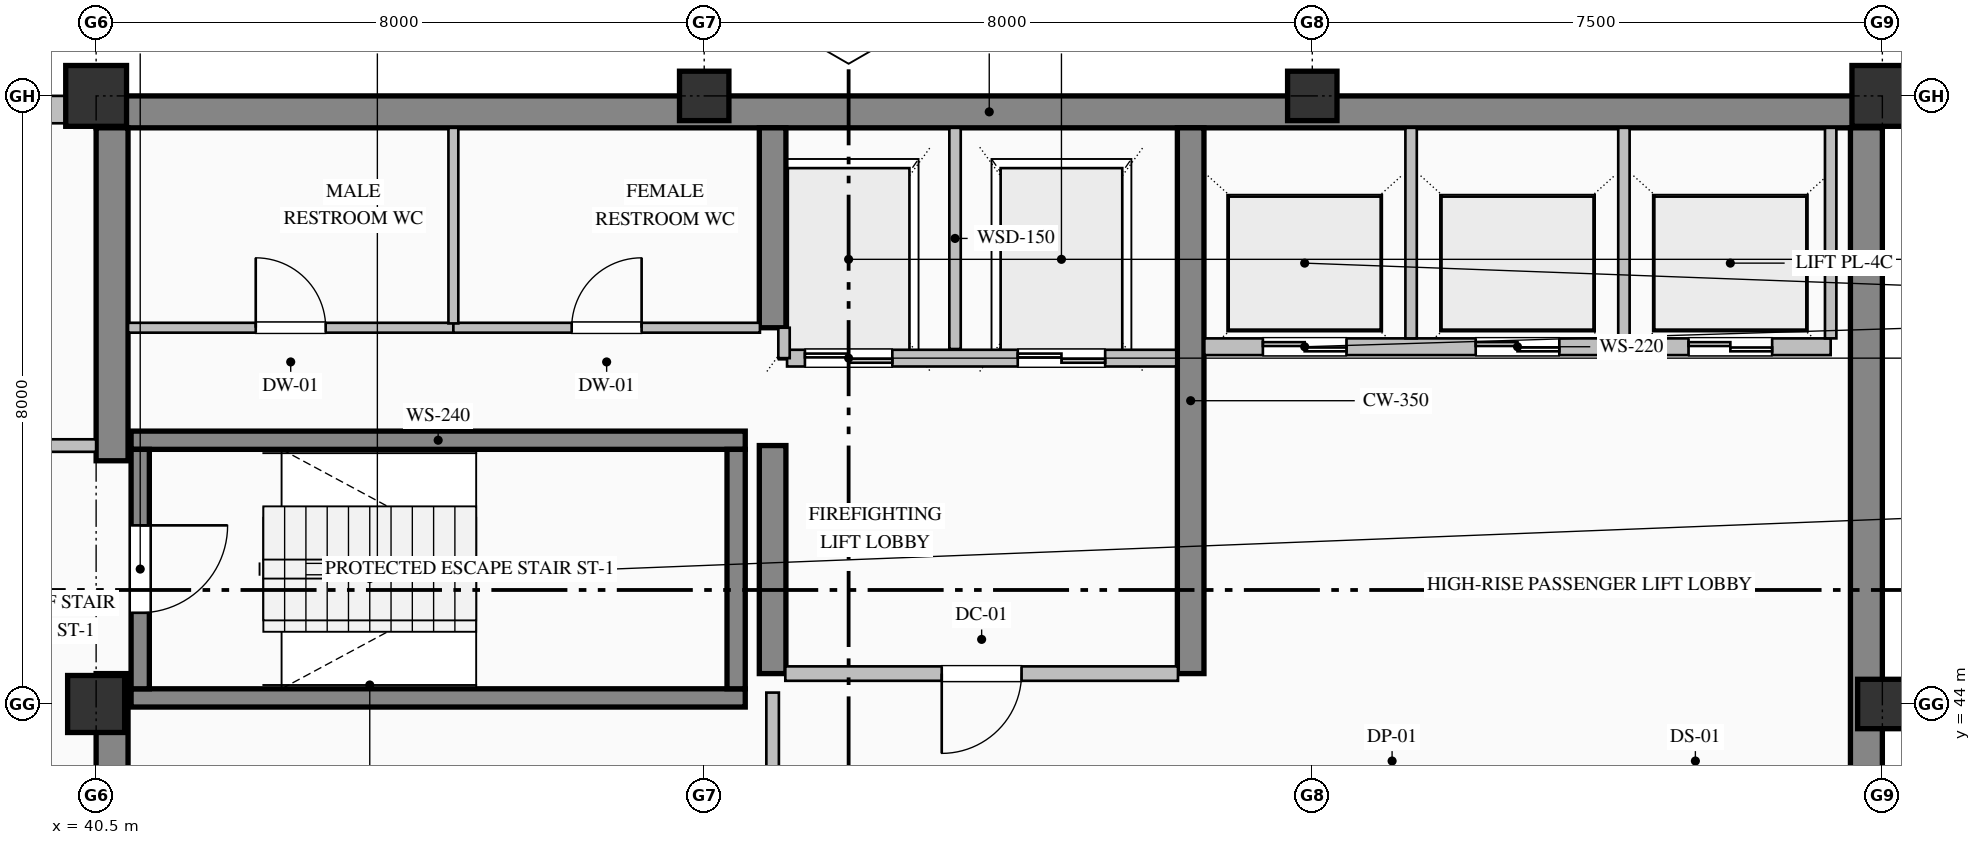
"""IFC4 building model, lengths in metres.
Left out: names, types, materials, properties, quantities, classifications, styles, units other than length and angle.
Written with IfcOpenShell. Run it as: python <this file> out.ifc"""

import sys

from ifc_helpers import new_model, si_unit, direction, frame, frame_2d, origin, origin_2d, place, context, subcontext, project, spatial, rectangle, hollow_rectangle, extrude, element, fill, save


model = new_model("IFC4")
c1 = context("Model", 3, precision=1e-05, world=origin(), true_north=direction((0.0, 1.0)))
c2 = subcontext(c1, "Body", "Model", "MODEL_VIEW")
j1 = project(units=[si_unit("LENGTHUNIT", "METRE"), si_unit("PLANEANGLEUNIT", "RADIAN")], contexts=[c1])
p1 = place(None, origin())
s1 = spatial("IfcSite", under=j1, at=p1, CompositionType="ELEMENT")
p2 = place(p1, origin())
s2 = spatial("IfcBuilding", under=s1, at=p2, CompositionType="ELEMENT")
p3 = place(p2, frame((0.0, 0.0, 331.2)))
s3 = spatial("IfcBuildingStorey", under=s2, at=p3, CompositionType="ELEMENT", Elevation=331.2)
p4 = place(p3, frame((40.5, 51.79, 0.0), z_axis=(0.0, 0.0, 1.0), x_axis=(1.0, 0.0, 0.0)))
e1 = element("IfcWall", 1, at=p4, inside=s3, PredefinedType="SHEAR", context=c2, shape_type="SweptSolid", body=[
    extrude(rectangle(XDim=23.5, YDim=0.42, at=frame_2d((11.75, 0.0))), origin(), (0.0, 0.0, 1.0), 3.785),
])
p5 = place(p3, frame((63.79, 36.32, 0.0), z_axis=(0.0, 0.0, 1.0), x_axis=(0.0, 1.0, 0.0)))
e2 = element("IfcWall", 2, at=p5, inside=s3, PredefinedType="SHEAR", context=c2, shape_type="SweptSolid", body=[
    extrude(rectangle(XDim=15.26, YDim=0.42, at=frame_2d((7.63, 0.0))), origin(), (0.0, 0.0, 1.0), 3.785),
])
p6 = place(p3, frame((40.71, 36.42, 0.0), z_axis=(0.0, 0.0, 1.0), x_axis=(0.0, 1.0, 0.0)))
e3 = element("IfcWall", 3, at=p6, inside=s3, PredefinedType="SHEAR", context=c2, shape_type="SweptSolid", body=[
    extrude(rectangle(XDim=7.98, YDim=0.42, at=frame_2d((3.99, 0.0))), origin(), (0.0, 0.0, 1.0), 3.785),
])
p7 = place(p3, frame((40.71, 47.2, 0.0), z_axis=(0.0, 0.0, 1.0), x_axis=(0.0, 1.0, 0.0)))
e4 = element("IfcWall", 4, at=p7, inside=s3, PredefinedType="SHEAR", context=c2, shape_type="SweptSolid", body=[
    extrude(rectangle(XDim=4.38, YDim=0.42, at=frame_2d((2.19, 0.0))), origin(), (0.0, 0.0, 1.0), 3.785),
])
p8 = place(p3, frame((49.4, 44.4, 0.0), z_axis=(0.0, 0.0, 1.0), x_axis=(0.0, 1.0, 0.0)))
e5 = element("IfcWall", 5, at=p8, inside=s3, PredefinedType="SHEAR", context=c2, shape_type="SweptSolid", body=[
    extrude(rectangle(XDim=3.0, YDim=0.35, at=frame_2d((1.5, 0.0))), origin(), (0.0, 0.0, 1.0), 3.785),
])
p9 = place(p3, frame((49.4, 48.95, 0.0), z_axis=(0.0, 0.0, 1.0), x_axis=(0.0, 1.0, 0.0)))
e6 = element("IfcWall", 6, at=p9, inside=s3, PredefinedType="SHEAR", context=c2, shape_type="SweptSolid", body=[
    extrude(rectangle(XDim=2.63, YDim=0.35, at=frame_2d((1.315, 0.0))), origin(), (0.0, 0.0, 1.0), 3.785),
])
p10 = place(p3, frame((54.9, 44.4, 0.0), z_axis=(0.0, 0.0, 1.0), x_axis=(0.0, 1.0, 0.0)))
e7 = element("IfcWall", 7, at=p10, inside=s3, PredefinedType="SHEAR", context=c2, shape_type="SweptSolid", body=[
    extrude(rectangle(XDim=7.18, YDim=0.35, at=frame_2d((3.59, 0.0))), origin(), (0.0, 0.0, 1.0), 3.785),
])
p11 = place(p3, frame((40.5, 44.0, 0.0), z_axis=(0.0, 0.0, 1.0), x_axis=(1.0, 0.0, 0.0)))
e8 = element("IfcColumn", 8, at=p11, inside=s3, PredefinedType="COLUMN", context=c2, shape_type="SweptSolid", body=[
    extrude(rectangle(XDim=0.75, YDim=0.75, at=origin_2d()), origin(), (0.0, 0.0, 1.0), 4.0),
])
p12 = place(p3, frame((40.5, 52.0, 0.0), z_axis=(0.0, 0.0, 1.0), x_axis=(1.0, 0.0, 0.0)))
e9 = element("IfcColumn", 9, at=p12, inside=s3, PredefinedType="COLUMN", context=c2, shape_type="SweptSolid", body=[
    extrude(hollow_rectangle(XDim=0.8, YDim=0.8, WallThickness=0.032, at=origin_2d()), origin(), (0.0, 0.0, 1.0), 4.0),
])
for number, where, z_axis, x_axis in (
    (10, (48.5, 52.0, 0.0), (0.0, 0.0, 1.0), (1.0, 0.0, 0.0)),
    (11, (56.5, 52.0, 0.0), (0.0, 0.0, 1.0), (1.0, 0.0, 0.0)),
    (12, (64.0, 44.0, 0.0), (0.0, 0.0, 1.0), (1.0, 0.0, 0.0)),
):
    element("IfcColumn", number, at=place(p3, frame(where, z_axis=z_axis, x_axis=x_axis)), inside=s3, PredefinedType="COLUMN", context=c2, shape_type="SweptSolid", body=[
        extrude(hollow_rectangle(XDim=0.65, YDim=0.65, WallThickness=0.028, at=origin_2d()), origin(), (0.0, 0.0, 1.0), 4.0),
    ])
p13 = place(p3, frame((64.0, 52.0, 0.0), z_axis=(0.0, 0.0, 1.0), x_axis=(1.0, 0.0, 0.0)))
e13 = element("IfcColumn", 13, at=p13, inside=s3, PredefinedType="COLUMN", context=c2, shape_type="SweptSolid", body=[
    extrude(hollow_rectangle(XDim=0.8, YDim=0.8, WallThickness=0.032, at=origin_2d()), origin(), (0.0, 0.0, 1.0), 4.0),
])
p14 = place(p3, frame((20.5, 51.82, 0.0), z_axis=(0.0, 0.0, 1.0), x_axis=(1.0, 0.0, 0.0)))
e14 = element("IfcWall", 14, at=p14, inside=s3, PredefinedType="SOLIDWALL", context=c2, shape_type="SweptSolid", body=[
    extrude(rectangle(XDim=20.02, YDim=0.36, at=frame_2d((10.01, 0.0))), origin(), (0.0, 0.0, 1.0), 3.335),
])
p15 = place(p14, frame((6.525, 0.0, 0.9)))
e15 = element("IfcOpeningElement", 15, at=p15, cuts=e14, PredefinedType="OPENING", context=c2, shape_type="SweptSolid", body=[
    extrude(rectangle(XDim=1.35, YDim=1.85, at=frame_2d((0.675, 0.925))), frame((0.0, 0.19, 0.0), z_axis=(0.0, -1.0, 0.0), x_axis=(1.0, 0.0, 0.0)), (0.0, 0.0, 1.0), 0.38),
])
p16 = place(p14, frame((10.325, 0.0, 0.9)))
e16 = element("IfcOpeningElement", 16, at=p16, cuts=e14, PredefinedType="OPENING", context=c2, shape_type="SweptSolid", body=[
    extrude(rectangle(XDim=0.95, YDim=1.85, at=frame_2d((0.475, 0.925))), frame((0.0, 0.19, 0.0), z_axis=(0.0, -1.0, 0.0), x_axis=(1.0, 0.0, 0.0)), (0.0, 0.0, 1.0), 0.38),
])
for number, where, z_axis, x_axis in (
    (17, (40.96, 47.47, 0.0), (0.0, 0.0, 1.0), (1.0, 0.0, 0.0)),
    (18, (49.04, 44.08, 0.0), (0.0, 0.0, 1.0), (-1.0, 0.0, 0.0)),
):
    element("IfcWall", number, at=place(p3, frame(where, z_axis=z_axis, x_axis=x_axis)), inside=s3, PredefinedType="SOLIDWALL", context=c2, shape_type="SweptSolid", body=[
        extrude(rectangle(XDim=8.08, YDim=0.24, at=frame_2d((4.04, 0.0))), origin(), (0.0, 0.0, 1.0), 4.0),
    ])
p17 = place(p3, frame((41.08, 47.35, 0.0), z_axis=(0.0, 0.0, 1.0), x_axis=(0.0, -1.0, 0.0)))
e19 = element("IfcWall", 19, at=p17, inside=s3, PredefinedType="SOLIDWALL", context=c2, shape_type="SweptSolid", body=[
    extrude(rectangle(XDim=3.15, YDim=0.24, at=frame_2d((1.575, 0.0))), origin(), (0.0, 0.0, 1.0), 4.0),
])
p18 = place(p17, frame((1.0, 0.0, 0.0)))
e20 = element("IfcOpeningElement", 20, at=p18, cuts=e19, PredefinedType="OPENING", context=c2, shape_type="SweptSolid", body=[
    extrude(rectangle(XDim=1.15, YDim=2.2, at=frame_2d((0.575, 1.1))), frame((0.0, 0.13, 0.0), z_axis=(0.0, -1.0, 0.0), x_axis=(1.0, 0.0, 0.0)), (0.0, 0.0, 1.0), 0.26),
])
p19 = place(p3, frame((48.92, 44.2, 0.0), z_axis=(0.0, 0.0, 1.0), x_axis=(0.0, 1.0, 0.0)))
e21 = element("IfcWall", 21, at=p19, inside=s3, PredefinedType="SOLIDWALL", context=c2, shape_type="SweptSolid", body=[
    extrude(rectangle(XDim=3.15, YDim=0.24, at=frame_2d((1.575, 0.0))), origin(), (0.0, 0.0, 1.0), 4.0),
])
p20 = place(p3, frame((54.71, 48.55, 0.0), z_axis=(0.0, 0.0, 1.0), x_axis=(-1.0, 0.0, 0.0)))
e22 = element("IfcWall", 22, at=p20, inside=s3, PredefinedType="PARTITIONING", context=c2, shape_type="SweptSolid", body=[
    extrude(rectangle(XDim=5.12, YDim=0.22, at=frame_2d((2.56, 0.0))), origin(), (0.0, 0.0, 1.0), 3.785),
])
p21 = place(p20, frame((3.735, 0.0, 0.0)))
e23 = element("IfcOpeningElement", 23, at=p21, cuts=e22, PredefinedType="OPENING", context=c2, shape_type="SweptSolid", body=[
    extrude(rectangle(XDim=1.15, YDim=2.2, at=frame_2d((0.575, 1.1))), frame((0.0, 0.12, 0.0), z_axis=(0.0, -1.0, 0.0), x_axis=(1.0, 0.0, 0.0)), (0.0, 0.0, 1.0), 0.24),
])
p22 = place(p20, frame((0.935, 0.0, 0.0)))
e24 = element("IfcOpeningElement", 24, at=p22, cuts=e22, PredefinedType="OPENING", context=c2, shape_type="SweptSolid", body=[
    extrude(rectangle(XDim=1.15, YDim=2.2, at=frame_2d((0.575, 1.1))), frame((0.0, 0.12, 0.0), z_axis=(0.0, -1.0, 0.0), x_axis=(1.0, 0.0, 0.0)), (0.0, 0.0, 1.0), 0.24),
])
p23 = place(p3, frame((51.8, 48.67, 0.0), z_axis=(0.0, 0.0, 1.0), x_axis=(0.0, 1.0, 0.0)))
e25 = element("IfcWall", 25, at=p23, inside=s3, PredefinedType="PARTITIONING", context=c2, shape_type="SweptSolid", body=[
    extrude(rectangle(XDim=2.91, YDim=0.15, at=frame_2d((1.455, 0.0))), origin(), (0.0, 0.0, 1.0), 3.785),
])
p24 = place(p3, frame((49.55, 48.55, 0.0), z_axis=(0.0, 0.0, 1.0), x_axis=(0.0, 1.0, 0.0)))
e26 = element("IfcWall", 26, at=p24, inside=s3, PredefinedType="PARTITIONING", context=c2, shape_type="SweptSolid", body=[
    extrude(rectangle(XDim=0.4, YDim=0.15, at=frame_2d((0.2, 0.0))), origin(), (0.0, 0.0, 1.0), 3.785),
])
p25 = place(p3, frame((63.32, 48.7, 0.0), z_axis=(0.0, 0.0, 1.0), x_axis=(-1.0, 0.0, 0.0)))
e27 = element("IfcWall", 27, at=p25, inside=s3, PredefinedType="PARTITIONING", context=c2, shape_type="SweptSolid", body=[
    extrude(rectangle(XDim=8.24, YDim=0.22, at=frame_2d((4.12, 0.0))), origin(), (0.0, 0.0, 1.0), 3.785),
])
p26 = place(p25, frame((6.37, 0.0, 0.0)))
e28 = element("IfcOpeningElement", 28, at=p26, cuts=e27, PredefinedType="OPENING", context=c2, shape_type="SweptSolid", body=[
    extrude(rectangle(XDim=1.1, YDim=2.2, at=frame_2d((0.55, 1.1))), frame((0.0, 0.12, 0.0), z_axis=(0.0, -1.0, 0.0), x_axis=(1.0, 0.0, 0.0)), (0.0, 0.0, 1.0), 0.24),
])
p27 = place(p25, frame((3.57, 0.0, 0.0)))
e29 = element("IfcOpeningElement", 29, at=p27, cuts=e27, PredefinedType="OPENING", context=c2, shape_type="SweptSolid", body=[
    extrude(rectangle(XDim=1.1, YDim=2.2, at=frame_2d((0.55, 1.1))), frame((0.0, 0.12, 0.0), z_axis=(0.0, -1.0, 0.0), x_axis=(1.0, 0.0, 0.0)), (0.0, 0.0, 1.0), 0.24),
])
p28 = place(p25, frame((0.77, 0.0, 0.0)))
e30 = element("IfcOpeningElement", 30, at=p28, cuts=e27, PredefinedType="OPENING", context=c2, shape_type="SweptSolid", body=[
    extrude(rectangle(XDim=1.1, YDim=2.2, at=frame_2d((0.55, 1.1))), frame((0.0, 0.12, 0.0), z_axis=(0.0, -1.0, 0.0), x_axis=(1.0, 0.0, 0.0)), (0.0, 0.0, 1.0), 0.24),
])
for number, where, z_axis, x_axis in (
    (31, (57.8, 48.81, 0.0), (0.0, 0.0, 1.0), (0.0, 1.0, 0.0)),
    (32, (60.6, 48.81, 0.0), (0.0, 0.0, 1.0), (0.0, 1.0, 0.0)),
    (33, (63.32, 48.81, 0.0), (0.0, 0.0, 1.0), (0.0, 1.0, 0.0)),
):
    element("IfcWall", number, at=place(p3, frame(where, z_axis=z_axis, x_axis=x_axis)), inside=s3, PredefinedType="PARTITIONING", context=c2, shape_type="SweptSolid", body=[
        extrude(rectangle(XDim=2.77, YDim=0.15, at=frame_2d((1.385, 0.0))), origin(), (0.0, 0.0, 1.0), 3.785),
    ])
p29 = place(p3, frame((37.8, 47.4, 0.0), z_axis=(0.0, 0.0, 1.0), x_axis=(1.0, 0.0, 0.0)))
e34 = element("IfcWall", 34, at=p29, inside=s3, PredefinedType="PARTITIONING", context=c2, shape_type="SweptSolid", body=[
    extrude(rectangle(XDim=2.7, YDim=0.165, at=frame_2d((1.35, 0.0))), origin(), (0.0, 0.0, 1.0), 3.785),
])
p30 = place(p29, frame((0.825, 0.0, 0.0)))
e35 = element("IfcOpeningElement", 35, at=p30, cuts=e34, PredefinedType="OPENING", context=c2, shape_type="SweptSolid", body=[
    extrude(rectangle(XDim=1.05, YDim=2.15, at=frame_2d((0.525, 1.075))), frame((0.0, 0.093, 0.0), z_axis=(0.0, -1.0, 0.0), x_axis=(1.0, 0.0, 0.0)), (0.0, 0.0, 1.0), 0.185),
])
p31 = place(p3, frame((40.92, 48.95, 0.0), z_axis=(0.0, 0.0, 1.0), x_axis=(1.0, 0.0, 0.0)))
e36 = element("IfcWall", 36, at=p31, inside=s3, PredefinedType="PARTITIONING", context=c2, shape_type="SweptSolid", body=[
    extrude(rectangle(XDim=4.28, YDim=0.13, at=frame_2d((2.14, 0.0))), origin(), (0.0, 0.0, 1.0), 3.785),
])
p32 = place(p31, frame((1.68, 0.0, 0.0)))
e37 = element("IfcOpeningElement", 37, at=p32, cuts=e36, PredefinedType="OPENING", context=c2, shape_type="SweptSolid", body=[
    extrude(rectangle(XDim=0.92, YDim=2.15, at=frame_2d((0.46, 1.075))), frame((0.0, 0.075, 0.0), z_axis=(0.0, -1.0, 0.0), x_axis=(1.0, 0.0, 0.0)), (0.0, 0.0, 1.0), 0.15),
])
p33 = place(p3, frame((45.2, 48.95, 0.0), z_axis=(0.0, 0.0, 1.0), x_axis=(1.0, 0.0, 0.0)))
e38 = element("IfcWall", 38, at=p33, inside=s3, PredefinedType="PARTITIONING", context=c2, shape_type="SweptSolid", body=[
    extrude(rectangle(XDim=4.033, YDim=0.13, at=frame_2d((2.017, 0.0))), origin(), (0.0, 0.0, 1.0), 3.785),
])
p34 = place(p33, frame((1.556, 0.0, 0.0)))
e39 = element("IfcOpeningElement", 39, at=p34, cuts=e38, PredefinedType="OPENING", context=c2, shape_type="SweptSolid", body=[
    extrude(rectangle(XDim=0.92, YDim=2.15, at=frame_2d((0.46, 1.075))), frame((0.0, 0.075, 0.0), z_axis=(0.0, -1.0, 0.0), x_axis=(1.0, 0.0, 0.0)), (0.0, 0.0, 1.0), 0.15),
])
p35 = place(p3, frame((54.733, 44.4, 0.0), z_axis=(0.0, 0.0, 1.0), x_axis=(-1.0, 0.0, 0.0)))
e40 = element("IfcWall", 40, at=p35, inside=s3, PredefinedType="PARTITIONING", context=c2, shape_type="SweptSolid", body=[
    extrude(rectangle(XDim=5.166, YDim=0.19, at=frame_2d((2.583, 0.0))), origin(), (0.0, 0.0, 1.0), 3.785),
])
p36 = place(p35, frame((2.058, 0.0, 0.0)))
e41 = element("IfcOpeningElement", 41, at=p36, cuts=e40, PredefinedType="OPENING", context=c2, shape_type="SweptSolid", body=[
    extrude(rectangle(XDim=1.05, YDim=2.15, at=frame_2d((0.525, 1.075))), frame((0.0, 0.105, 0.0), z_axis=(0.0, -1.0, 0.0), x_axis=(1.0, 0.0, 0.0)), (0.0, 0.0, 1.0), 0.21),
])
p37 = place(p3, frame((49.4, 39.665, 0.0), z_axis=(0.0, 0.0, 1.0), x_axis=(0.0, 1.0, 0.0)))
e42 = element("IfcWall", 42, at=p37, inside=s3, PredefinedType="PARTITIONING", context=c2, shape_type="SweptSolid", body=[
    extrude(rectangle(XDim=4.485, YDim=0.165, at=frame_2d((2.243, 0.0))), origin(), (0.0, 0.0, 1.0), 3.027),
])
p38 = place(p37, frame((1.793, 0.0, 0.0)))
e43 = element("IfcOpeningElement", 43, at=p38, cuts=e42, PredefinedType="OPENING", context=c2, shape_type="SweptSolid", body=[
    extrude(rectangle(XDim=0.9, YDim=2.15, at=frame_2d((0.45, 1.075))), frame((0.0, 0.093, 0.0), z_axis=(0.0, -1.0, 0.0), x_axis=(1.0, 0.0, 0.0)), (0.0, 0.0, 1.0), 0.185),
])
p39 = place(p3, frame((45.2, 51.58, 0.0), z_axis=(0.0, 0.0, 1.0), x_axis=(0.0, -1.0, 0.0)))
e44 = element("IfcWall", 44, at=p39, inside=s3, PredefinedType="PARTITIONING", context=c2, shape_type="SweptSolid", body=[
    extrude(rectangle(XDim=2.573, YDim=0.13, at=frame_2d((1.287, 0.0))), origin(), (0.0, 0.0, 1.0), 3.785),
])
p40 = place(p18, origin())
e45 = element("IfcDoor", 45, at=p40, inside=s3, OperationType="SINGLE_SWING_LEFT", PredefinedType="DOOR", context=c2, shape_type="SweptSolid", body=[
    extrude(rectangle(XDim=1.15, YDim=2.2, at=frame_2d((0.575, 1.1))), frame((0.0, 0.025, 0.0), z_axis=(0.0, -1.0, 0.0), x_axis=(1.0, 0.0, 0.0)), (0.0, 0.0, 1.0), 0.05),
])
fill(e20, e45)
p41 = place(p21, origin())
e46 = element("IfcDoor", 46, at=p41, inside=s3, OperationType="DOUBLE_DOOR_SLIDING", PredefinedType="DOOR", context=c2, shape_type="SweptSolid", body=[
    extrude(rectangle(XDim=1.15, YDim=2.2, at=frame_2d((0.575, 1.1))), frame((0.0, 0.025, 0.0), z_axis=(0.0, -1.0, 0.0), x_axis=(1.0, 0.0, 0.0)), (0.0, 0.0, 1.0), 0.05),
])
fill(e23, e46)
p42 = place(p22, origin())
e47 = element("IfcDoor", 47, at=p42, inside=s3, OperationType="DOUBLE_DOOR_SLIDING", PredefinedType="DOOR", context=c2, shape_type="SweptSolid", body=[
    extrude(rectangle(XDim=1.15, YDim=2.2, at=frame_2d((0.575, 1.1))), frame((0.0, 0.025, 0.0), z_axis=(0.0, -1.0, 0.0), x_axis=(1.0, 0.0, 0.0)), (0.0, 0.0, 1.0), 0.05),
])
fill(e24, e47)
p43 = place(p26, origin())
e48 = element("IfcDoor", 48, at=p43, inside=s3, OperationType="DOUBLE_DOOR_SLIDING", PredefinedType="DOOR", context=c2, shape_type="SweptSolid", body=[
    extrude(rectangle(XDim=1.1, YDim=2.2, at=frame_2d((0.55, 1.1))), frame((0.0, 0.025, 0.0), z_axis=(0.0, -1.0, 0.0), x_axis=(1.0, 0.0, 0.0)), (0.0, 0.0, 1.0), 0.05),
])
fill(e28, e48)
p44 = place(p27, origin())
e49 = element("IfcDoor", 49, at=p44, inside=s3, OperationType="DOUBLE_DOOR_SLIDING", PredefinedType="DOOR", context=c2, shape_type="SweptSolid", body=[
    extrude(rectangle(XDim=1.1, YDim=2.2, at=frame_2d((0.55, 1.1))), frame((0.0, 0.025, 0.0), z_axis=(0.0, -1.0, 0.0), x_axis=(1.0, 0.0, 0.0)), (0.0, 0.0, 1.0), 0.05),
])
fill(e29, e49)
p45 = place(p28, origin())
e50 = element("IfcDoor", 50, at=p45, inside=s3, OperationType="DOUBLE_DOOR_SLIDING", PredefinedType="DOOR", context=c2, shape_type="SweptSolid", body=[
    extrude(rectangle(XDim=1.1, YDim=2.2, at=frame_2d((0.55, 1.1))), frame((0.0, 0.025, 0.0), z_axis=(0.0, -1.0, 0.0), x_axis=(1.0, 0.0, 0.0)), (0.0, 0.0, 1.0), 0.05),
])
fill(e30, e50)
p46 = place(p36, origin())
e51 = element("IfcDoor", 51, at=p46, inside=s3, OperationType="SINGLE_SWING_RIGHT", PredefinedType="DOOR", context=c2, shape_type="SweptSolid", body=[
    extrude(rectangle(XDim=1.05, YDim=2.15, at=frame_2d((0.525, 1.075))), frame((0.0, 0.025, 0.0), z_axis=(0.0, -1.0, 0.0), x_axis=(1.0, 0.0, 0.0)), (0.0, 0.0, 1.0), 0.05),
])
fill(e41, e51)
p47 = place(p32, origin())
e52 = element("IfcDoor", 52, at=p47, inside=s3, OperationType="SINGLE_SWING_LEFT", PredefinedType="DOOR", context=c2, shape_type="SweptSolid", body=[
    extrude(rectangle(XDim=0.92, YDim=2.15, at=frame_2d((0.46, 1.075))), frame((0.0, 0.025, 0.0), z_axis=(0.0, -1.0, 0.0), x_axis=(1.0, 0.0, 0.0)), (0.0, 0.0, 1.0), 0.05),
])
fill(e37, e52)
p48 = place(p34, origin())
e53 = element("IfcDoor", 53, at=p48, inside=s3, OperationType="SINGLE_SWING_RIGHT", PredefinedType="DOOR", context=c2, shape_type="SweptSolid", body=[
    extrude(rectangle(XDim=0.92, YDim=2.15, at=frame_2d((0.46, 1.075))), frame((0.0, 0.025, 0.0), z_axis=(0.0, -1.0, 0.0), x_axis=(1.0, 0.0, 0.0)), (0.0, 0.0, 1.0), 0.05),
])
fill(e39, e53)
save(model, sys.argv[1])
